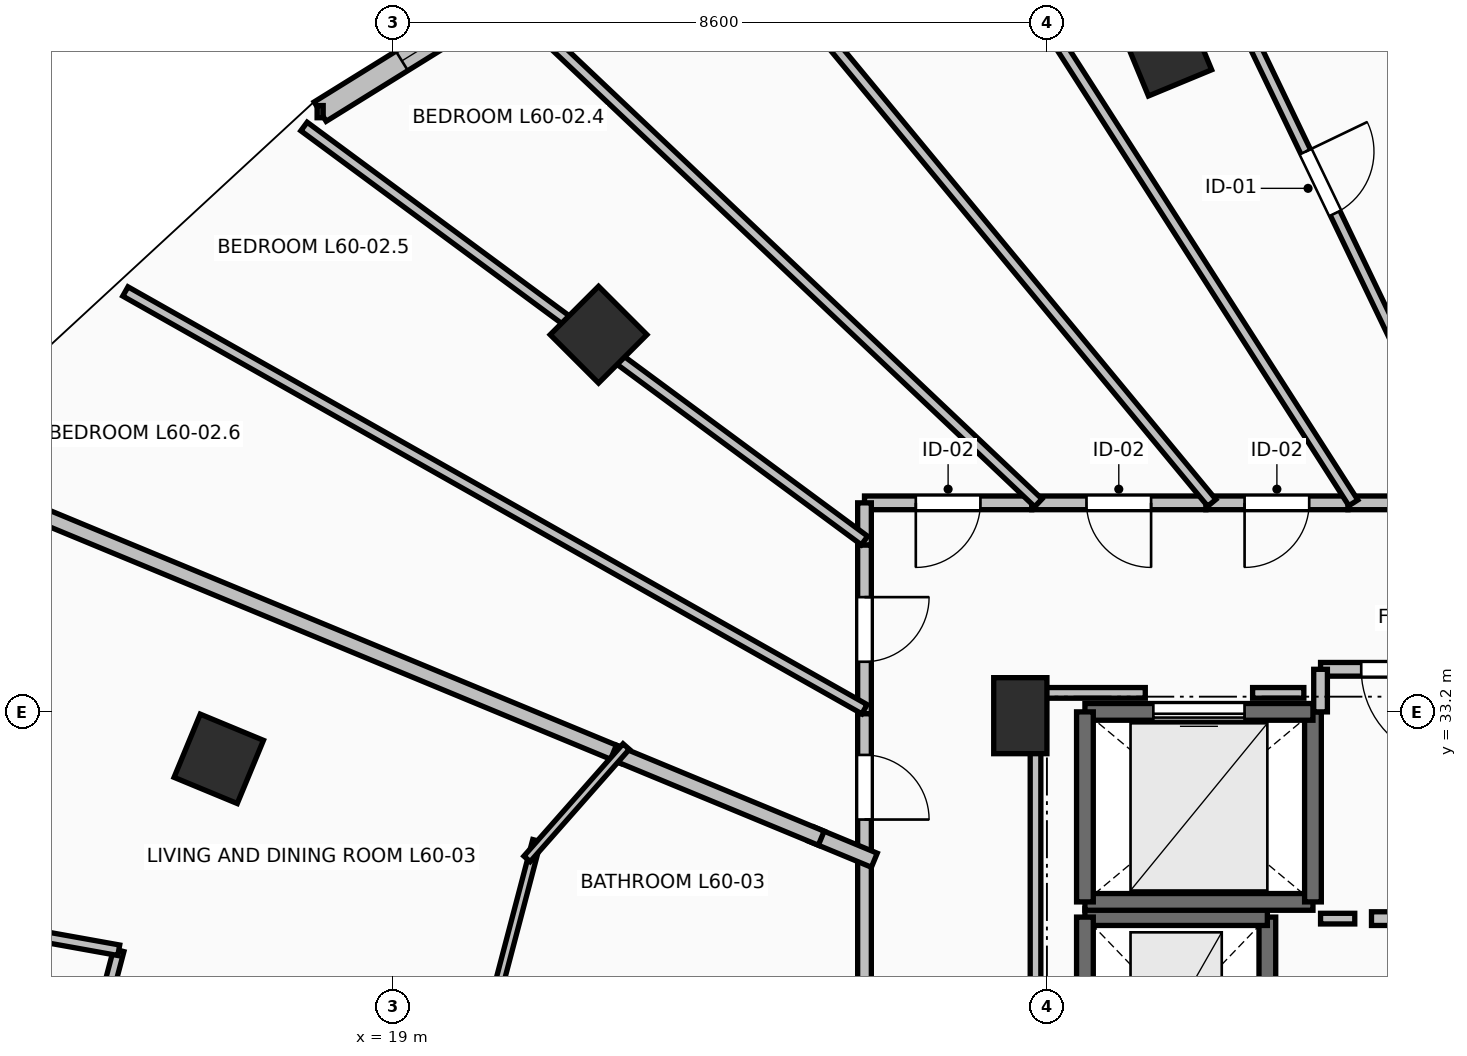
"""IFC4 building model, lengths in metres.
Left out: names, types, materials, properties, quantities, classifications, styles, units other than length and angle.
Written with IfcOpenShell. Run it as: python <this file> out.ifc"""

import sys

from ifc_helpers import new_model, si_unit, direction, frame, frame_2d, origin, origin_2d, place, context, subcontext, project, spatial, rectangle, extrude, element, fill, save


model = new_model("IFC4")
c1 = context("Model", 3, precision=1e-05, world=origin(), true_north=direction((0.0, 1.0)))
c2 = subcontext(c1, "Body", "Model", "MODEL_VIEW")
j1 = project(units=[si_unit("LENGTHUNIT", "METRE"), si_unit("PLANEANGLEUNIT", "RADIAN")], contexts=[c1])
p1 = place(None, origin())
s1 = spatial("IfcSite", under=j1, at=p1, CompositionType="ELEMENT")
p2 = place(p1, origin())
s2 = spatial("IfcBuilding", under=s1, at=p2, CompositionType="ELEMENT")
p3 = place(p2, frame((0.0, 0.0, 221.4)))
s3 = spatial("IfcBuildingStorey", under=s2, at=p3, CompositionType="ELEMENT", Elevation=221.4)
for number, where, z_axis, x_axis in (
    (1, (29.179, 41.891, 0.0), (0.0, 0.0, 1.0), (-0.383, 0.924, 0.0)),
    (2, (21.701, 38.162, 0.0), (0.0, 0.0, 1.0), (-0.707, 0.707, 0.0)),
    (3, (16.705, 32.582, 0.0), (0.0, 0.0, 1.0), (-0.924, 0.383, 0.0)),
):
    element("IfcColumn", number, at=place(p3, frame(where, z_axis=z_axis, x_axis=x_axis)), inside=s3, PredefinedType="COLUMN", context=c2, shape_type="SweptSolid", body=[
        extrude(rectangle(XDim=0.9, YDim=0.9, at=origin_2d()), origin(), (0.0, 0.0, 1.0), 3.55),
    ])
p4 = place(p3, frame((27.25, 33.15, 0.0), z_axis=(0.0, 0.0, 1.0), x_axis=(1.0, 0.0, 0.0)))
e4 = element("IfcColumn", 4, at=p4, inside=s3, PredefinedType="PILASTER", context=c2, shape_type="SweptSolid", body=[
    extrude(rectangle(XDim=0.7, YDim=1.0, at=origin_2d()), origin(), (0.0, 0.0, 1.0), 3.55),
])
p5 = place(p3, frame((22.316, 43.752, 0.0), z_axis=(0.0, 0.0, 1.0), x_axis=(-0.849647657754, -0.527350791858, 0.0)))
e5 = element("IfcWall", 5, at=p5, inside=s3, PredefinedType="STANDARD", context=c2, shape_type="SweptSolid", body=[
    extrude(rectangle(XDim=5.035, YDim=0.3, at=frame_2d((2.518, 0.0))), origin(), (0.0, 0.0, 1.0), 3.2),
])
p6 = place(p5, frame((0.555, 0.0, 0.85)))
e6 = element("IfcOpeningElement", 6, at=p6, cuts=e5, PredefinedType="OPENING", context=c2, shape_type="SweptSolid", body=[
    extrude(rectangle(XDim=1.2, YDim=1.95, at=frame_2d((0.6, 0.975))), frame((0.0, 0.165, 0.0), z_axis=(0.0, -1.0, 0.0), x_axis=(1.0, 0.0, 0.0)), (0.0, 0.0, 1.0), 0.33),
])
p7 = place(p5, frame((2.569, 0.0, 0.85)))
e7 = element("IfcOpeningElement", 7, at=p7, cuts=e5, PredefinedType="OPENING", context=c2, shape_type="SweptSolid", body=[
    extrude(rectangle(XDim=1.2, YDim=1.95, at=frame_2d((0.6, 0.975))), frame((0.0, 0.165, 0.0), z_axis=(0.0, -1.0, 0.0), x_axis=(1.0, 0.0, 0.0)), (0.0, 0.0, 1.0), 0.33),
])
p8 = place(p3, frame((30.5, 28.0, 0.0), z_axis=(0.0, 0.0, 1.0), x_axis=(0.0, 1.0, 0.0)))
e8 = element("IfcWall", 8, at=p8, inside=s3, PredefinedType="SHEAR", context=c2, shape_type="SweptSolid", body=[
    extrude(rectangle(XDim=2.5, YDim=0.22, at=frame_2d((1.25, 0.0))), origin(), (0.0, 0.0, 1.0), 3.2),
])
p9 = place(p3, frame((30.5, 30.5, 0.0), z_axis=(0.0, 0.0, 1.0), x_axis=(-1.0, 0.0, 0.0)))
e9 = element("IfcWall", 9, at=p9, inside=s3, PredefinedType="SHEAR", context=c2, shape_type="SweptSolid", body=[
    extrude(rectangle(XDim=2.4, YDim=0.22, at=frame_2d((1.2, 0.0))), origin(), (0.0, 0.0, 1.0), 3.2),
])
p10 = place(p3, frame((28.1, 30.5, 0.0), z_axis=(0.0, 0.0, 1.0), x_axis=(0.0, -1.0, 0.0)))
e10 = element("IfcWall", 10, at=p10, inside=s3, PredefinedType="SHEAR", context=c2, shape_type="SweptSolid", body=[
    extrude(rectangle(XDim=2.5, YDim=0.22, at=frame_2d((1.25, 0.0))), origin(), (0.0, 0.0, 1.0), 3.2),
])
p11 = place(p3, frame((28.1, 30.7, 0.0), z_axis=(0.0, 0.0, 1.0), x_axis=(1.0, 0.0, 0.0)))
e11 = element("IfcWall", 11, at=p11, inside=s3, PredefinedType="SOLIDWALL", context=c2, shape_type="SweptSolid", body=[
    extrude(rectangle(XDim=3.0, YDim=0.22, at=frame_2d((1.5, 0.0))), origin(), (0.0, 0.0, 1.0), 3.2),
])
p12 = place(p3, frame((31.1, 30.7, 0.0), z_axis=(0.0, 0.0, 1.0), x_axis=(0.0, 1.0, 0.0)))
e12 = element("IfcWall", 12, at=p12, inside=s3, PredefinedType="SOLIDWALL", context=c2, shape_type="SweptSolid", body=[
    extrude(rectangle(XDim=2.5, YDim=0.22, at=frame_2d((1.25, 0.0))), origin(), (0.0, 0.0, 1.0), 3.2),
])
p13 = place(p3, frame((31.1, 33.2, 0.0), z_axis=(0.0, 0.0, 1.0), x_axis=(-1.0, 0.0, 0.0)))
e13 = element("IfcWall", 13, at=p13, inside=s3, PredefinedType="SOLIDWALL", context=c2, shape_type="SweptSolid", body=[
    extrude(rectangle(XDim=3.0, YDim=0.22, at=frame_2d((1.5, 0.0))), origin(), (0.0, 0.0, 1.0), 3.2),
])
p14 = place(p13, frame((0.9, 0.0, 0.0)))
e14 = element("IfcOpeningElement", 14, at=p14, cuts=e13, PredefinedType="OPENING", context=c2, shape_type="SweptSolid", body=[
    extrude(rectangle(XDim=1.2, YDim=2.2, at=frame_2d((0.6, 1.1))), frame((0.0, 0.125, 0.0), z_axis=(0.0, -1.0, 0.0), x_axis=(1.0, 0.0, 0.0)), (0.0, 0.0, 1.0), 0.25),
])
p15 = place(p3, frame((28.1, 33.2, 0.0), z_axis=(0.0, 0.0, 1.0), x_axis=(0.0, -1.0, 0.0)))
e15 = element("IfcWall", 15, at=p15, inside=s3, PredefinedType="SOLIDWALL", context=c2, shape_type="SweptSolid", body=[
    extrude(rectangle(XDim=2.5, YDim=0.22, at=frame_2d((1.25, 0.0))), origin(), (0.0, 0.0, 1.0), 3.2),
])
p16 = place(p3, frame((31.87, 30.48, 0.0), z_axis=(0.0, 0.0, 1.0), x_axis=(1.0, 0.0, 0.0)))
e16 = element("IfcWall", 16, at=p16, inside=s3, PredefinedType="PARTITIONING", context=c2, shape_type="SweptSolid", body=[
    extrude(rectangle(XDim=1.6, YDim=0.18, at=frame_2d((0.8, 0.0))), origin(), (0.0, 0.0, 1.0), 3.2),
])
p17 = place(p3, frame((33.47, 33.76, 0.0), z_axis=(0.0, 0.0, 1.0), x_axis=(-1.0, 0.0, 0.0)))
e17 = element("IfcWall", 17, at=p17, inside=s3, PredefinedType="PARTITIONING", context=c2, shape_type="SweptSolid", body=[
    extrude(rectangle(XDim=2.27, YDim=0.18, at=frame_2d((1.135, 0.0))), origin(), (0.0, 0.0, 1.0), 3.2),
])
p18 = place(p17, frame((0.535, 0.0, 0.0)))
e18 = element("IfcOpeningElement", 18, at=p18, cuts=e17, PredefinedType="OPENING", context=c2, shape_type="SweptSolid", body=[
    extrude(rectangle(XDim=1.2, YDim=2.15, at=frame_2d((0.6, 1.075))), frame((0.0, 0.105, 0.0), z_axis=(0.0, -1.0, 0.0), x_axis=(1.0, 0.0, 0.0)), (0.0, 0.0, 1.0), 0.21),
])
p19 = place(p3, frame((31.2, 33.76, 0.0), z_axis=(0.0, 0.0, 1.0), x_axis=(0.0, -1.0, 0.0)))
e19 = element("IfcWall", 19, at=p19, inside=s3, PredefinedType="PARTITIONING", context=c2, shape_type="SweptSolid", body=[
    extrude(rectangle(XDim=0.56, YDim=0.18, at=frame_2d((0.28, 0.0))), origin(), (0.0, 0.0, 1.0), 3.2),
])
p20 = place(p3, frame((33.155, 35.95, 0.0), z_axis=(0.0, 0.0, 1.0), x_axis=(-1.0, 0.0, 0.0)))
e20 = element("IfcWall", 20, at=p20, inside=s3, PredefinedType="PARTITIONING", context=c2, shape_type="SweptSolid", body=[
    extrude(rectangle(XDim=1.595, YDim=0.18, at=frame_2d((0.797, 0.0))), origin(), (0.0, 0.0, 1.0), 3.2),
])
p21 = place(p3, frame((31.56, 35.95, 0.0), z_axis=(0.0, 0.0, 1.0), x_axis=(-1.0, 0.0, 0.0)))
e21 = element("IfcWall", 21, at=p21, inside=s3, PredefinedType="PARTITIONING", context=c2, shape_type="SweptSolid", body=[
    extrude(rectangle(XDim=1.869, YDim=0.18, at=frame_2d((0.935, 0.0))), origin(), (0.0, 0.0, 1.0), 2.392),
])
p22 = place(p21, frame((0.51, 0.0, 0.0)))
e22 = element("IfcOpeningElement", 22, at=p22, cuts=e21, PredefinedType="OPENING", context=c2, shape_type="SweptSolid", body=[
    extrude(rectangle(XDim=0.85, YDim=2.1, at=frame_2d((0.425, 1.05))), frame((0.0, 0.105, 0.0), z_axis=(0.0, -1.0, 0.0), x_axis=(1.0, 0.0, 0.0)), (0.0, 0.0, 1.0), 0.21),
])
p23 = place(p3, frame((29.691, 35.95, 0.0), z_axis=(0.0, 0.0, 1.0), x_axis=(-1.0, 0.0, 0.0)))
e23 = element("IfcWall", 23, at=p23, inside=s3, PredefinedType="PARTITIONING", context=c2, shape_type="SweptSolid", body=[
    extrude(rectangle(XDim=2.291, YDim=0.18, at=frame_2d((1.146, 0.0))), origin(), (0.0, 0.0, 1.0), 2.392),
])
p24 = place(p23, frame((0.72, 0.0, 0.0)))
e24 = element("IfcOpeningElement", 24, at=p24, cuts=e23, PredefinedType="OPENING", context=c2, shape_type="SweptSolid", body=[
    extrude(rectangle(XDim=0.85, YDim=2.1, at=frame_2d((0.425, 1.05))), frame((0.0, 0.105, 0.0), z_axis=(0.0, -1.0, 0.0), x_axis=(1.0, 0.0, 0.0)), (0.0, 0.0, 1.0), 0.21),
])
p25 = place(p3, frame((27.4, 35.95, 0.0), z_axis=(0.0, 0.0, 1.0), x_axis=(-1.0, 0.0, 0.0)))
e25 = element("IfcWall", 25, at=p25, inside=s3, PredefinedType="PARTITIONING", context=c2, shape_type="SweptSolid", body=[
    extrude(rectangle(XDim=2.2, YDim=0.18, at=frame_2d((1.1, 0.0))), origin(), (0.0, 0.0, 1.0), 2.834),
])
p26 = place(p25, frame((0.675, 0.0, 0.0)))
e26 = element("IfcOpeningElement", 26, at=p26, cuts=e25, PredefinedType="OPENING", context=c2, shape_type="SweptSolid", body=[
    extrude(rectangle(XDim=0.85, YDim=2.1, at=frame_2d((0.425, 1.05))), frame((0.0, 0.105, 0.0), z_axis=(0.0, -1.0, 0.0), x_axis=(1.0, 0.0, 0.0)), (0.0, 0.0, 1.0), 0.21),
])
p27 = place(p3, frame((25.2, 35.95, 0.0), z_axis=(0.0, 0.0, 1.0), x_axis=(0.0, -1.0, 0.0)))
e27 = element("IfcWall", 27, at=p27, inside=s3, PredefinedType="PARTITIONING", context=c2, shape_type="SweptSolid", body=[
    extrude(rectangle(XDim=0.556, YDim=0.18, at=frame_2d((0.278, 0.0))), origin(), (0.0, 0.0, 1.0), 3.2),
])
p28 = place(p3, frame((25.2, 35.394, 0.0), z_axis=(0.0, 0.0, 1.0), x_axis=(0.0, -1.0, 0.0)))
e28 = element("IfcWall", 28, at=p28, inside=s3, PredefinedType="PARTITIONING", context=c2, shape_type="SweptSolid", body=[
    extrude(rectangle(XDim=2.219, YDim=0.18, at=frame_2d((1.109, 0.0))), origin(), (0.0, 0.0, 1.0), 2.392),
])
p29 = place(p28, frame((0.685, 0.0, 0.0)))
e29 = element("IfcOpeningElement", 29, at=p29, cuts=e28, PredefinedType="OPENING", context=c2, shape_type="SweptSolid", body=[
    extrude(rectangle(XDim=0.85, YDim=2.1, at=frame_2d((0.425, 1.05))), frame((0.0, 0.105, 0.0), z_axis=(0.0, -1.0, 0.0), x_axis=(1.0, 0.0, 0.0)), (0.0, 0.0, 1.0), 0.21),
])
p30 = place(p3, frame((25.2, 33.175, 0.0), z_axis=(0.0, 0.0, 1.0), x_axis=(0.0, -1.0, 0.0)))
e30 = element("IfcWall", 30, at=p30, inside=s3, PredefinedType="PARTITIONING", context=c2, shape_type="SweptSolid", body=[
    extrude(rectangle(XDim=1.933, YDim=0.18, at=frame_2d((0.967, 0.0))), origin(), (0.0, 0.0, 1.0), 3.2),
])
p31 = place(p30, frame((0.542, 0.0, 0.0)))
e31 = element("IfcOpeningElement", 31, at=p31, cuts=e30, PredefinedType="OPENING", context=c2, shape_type="SweptSolid", body=[
    extrude(rectangle(XDim=0.85, YDim=2.1, at=frame_2d((0.425, 1.05))), frame((0.0, 0.105, 0.0), z_axis=(0.0, -1.0, 0.0), x_axis=(1.0, 0.0, 0.0)), (0.0, 0.0, 1.0), 0.21),
])
p32 = place(p3, frame((25.2, 31.382, 0.0), z_axis=(0.0, 0.0, 1.0), x_axis=(0.0, -1.0, 0.0)))
e32 = element("IfcWall", 32, at=p32, inside=s3, PredefinedType="PARTITIONING", context=c2, shape_type="SweptSolid", body=[
    extrude(rectangle(XDim=2.923, YDim=0.18, at=frame_2d((1.461, 0.0))), origin(), (0.0, 0.0, 1.0), 2.392),
])
p33 = place(p3, frame((29.174, 44.381, 0.0), z_axis=(0.0, 0.0, 1.0), x_axis=(0.432861754343, -0.901460316169, 0.0)))
e33 = element("IfcWall", 33, at=p33, inside=s3, PredefinedType="PARTITIONING", context=c2, shape_type="SweptSolid", body=[
    extrude(rectangle(XDim=9.353, YDim=0.14, at=frame_2d((4.676, 0.0))), origin(), (0.0, 0.0, 1.0), 2.392),
])
p34 = place(p33, frame((4.226, 0.0, 0.0)))
e34 = element("IfcOpeningElement", 34, at=p34, cuts=e33, PredefinedType="OPENING", context=c2, shape_type="SweptSolid", body=[
    extrude(rectangle(XDim=0.9, YDim=2.1, at=frame_2d((0.45, 1.05))), frame((0.0, 0.085, 0.0), z_axis=(0.0, -1.0, 0.0), x_axis=(1.0, 0.0, 0.0)), (0.0, 0.0, 1.0), 0.17),
])
p35 = place(p3, frame((25.749, 45.138, 0.0), z_axis=(0.0, 0.0, 1.0), x_axis=(0.539168632786, -0.842197830335, 0.0)))
e35 = element("IfcWall", 35, at=p35, inside=s3, PredefinedType="PARTITIONING", context=c2, shape_type="SweptSolid", body=[
    extrude(rectangle(XDim=10.909, YDim=0.14, at=frame_2d((5.455, 0.0))), origin(), (0.0, 0.0, 1.0), 2.392),
])
p36 = place(p3, frame((23.066, 44.052, 0.0), z_axis=(0.0, 0.0, 1.0), x_axis=(0.637453668746, -0.770488689211, 0.0)))
e36 = element("IfcWall", 36, at=p36, inside=s3, PredefinedType="PARTITIONING", context=c2, shape_type="SweptSolid", body=[
    extrude(rectangle(XDim=10.515, YDim=0.14, at=frame_2d((5.258, 0.0))), origin(), (0.0, 0.0, 1.0), 2.392),
])
p37 = place(p3, frame((20.462, 42.599, 0.0), z_axis=(0.0, 0.0, 1.0), x_axis=(0.726274273347, -0.687405033349, 0.0)))
e37 = element("IfcWall", 37, at=p37, inside=s3, PredefinedType="PARTITIONING", context=c2, shape_type="SweptSolid", body=[
    extrude(rectangle(XDim=9.673, YDim=0.14, at=frame_2d((4.836, 0.0))), origin(), (0.0, 0.0, 1.0), 2.734),
])
p38 = place(p3, frame((17.826, 40.901, 0.0), z_axis=(0.0, 0.0, 1.0), x_axis=(0.804363169868, -0.594137939338, 0.0)))
e38 = element("IfcWall", 38, at=p38, inside=s3, PredefinedType="PARTITIONING", context=c2, shape_type="SweptSolid", body=[
    extrude(rectangle(XDim=9.167, YDim=0.14, at=frame_2d((4.584, 0.0))), origin(), (0.0, 0.0, 1.0), 2.392),
])
p39 = place(p3, frame((15.476, 38.731, 0.0), z_axis=(0.0, 0.0, 1.0), x_axis=(0.870572608778, -0.49203997078, 0.0)))
e39 = element("IfcWall", 39, at=p39, inside=s3, PredefinedType="PARTITIONING", context=c2, shape_type="SweptSolid", body=[
    extrude(rectangle(XDim=11.169, YDim=0.14, at=frame_2d((5.585, 0.0))), origin(), (0.0, 0.0, 1.0), 2.734),
])
p40 = place(p3, frame((13.36, 36.206, 0.0), z_axis=(0.0, 0.0, 1.0), x_axis=(0.923875681471, -0.382692729466, 0.0)))
e40 = element("IfcWall", 40, at=p40, inside=s3, PredefinedType="PARTITIONING", context=c2, shape_type="SweptSolid", body=[
    extrude(rectangle(XDim=9.381, YDim=0.2, at=frame_2d((4.69, 0.0))), origin(), (0.0, 0.0, 1.0), 2.734),
])
p41 = place(p3, frame((24.502, 31.592, 0.0), z_axis=(0.0, 0.0, 1.0), x_axis=(0.923704487622, -0.383105755043, 0.0)))
e41 = element("IfcWall", 41, at=p41, inside=s3, PredefinedType="PARTITIONING", context=c2, shape_type="SweptSolid", body=[
    extrude(rectangle(XDim=0.896, YDim=0.2, at=frame_2d((0.448, 0.0))), origin(), (0.0, 0.0, 1.0), 3.2),
])
p42 = place(p3, frame((21.898, 32.67, 0.0), z_axis=(0.0, 0.0, 1.0), x_axis=(0.923953480513, -0.382504857286, 0.0)))
e42 = element("IfcWall", 42, at=p42, inside=s3, PredefinedType="PARTITIONING", context=c2, shape_type="SweptSolid", body=[
    extrude(rectangle(XDim=2.958, YDim=0.2, at=frame_2d((1.479, 0.0))), origin(), (0.0, 0.0, 1.0), 2.834),
])
p43 = place(p3, frame((20.324, 29.362, 0.0), z_axis=(0.0, 0.0, 1.0), x_axis=(0.254406599134, 0.967097348935, 0.0)))
e43 = element("IfcWall", 43, at=p43, inside=s3, PredefinedType="PARTITIONING", context=c2, shape_type="SweptSolid", body=[
    extrude(rectangle(XDim=2.218, YDim=0.11, at=frame_2d((1.109, 0.0))), origin(), (0.0, 0.0, 1.0), 2.392),
])
p44 = place(p3, frame((20.76, 31.266, 0.0), z_axis=(0.0, 0.0, 1.0), x_axis=(0.661699472354, 0.749769170003, 0.0)))
e44 = element("IfcWall", 44, at=p44, inside=s3, PredefinedType="PARTITIONING", context=c2, shape_type="SweptSolid", body=[
    extrude(rectangle(XDim=1.971, YDim=0.11, at=frame_2d((0.985, 0.0))), origin(), (0.0, 0.0, 1.0), 3.2),
])
p45 = place(p3, frame((15.389, 30.064, 0.0), z_axis=(0.0, 0.0, 1.0), x_axis=(-0.254356027292, -0.967110651053, 0.0)))
e45 = element("IfcWall", 45, at=p45, inside=s3, PredefinedType="PARTITIONING", context=c2, shape_type="SweptSolid", body=[
    extrude(rectangle(XDim=4.202, YDim=0.14, at=frame_2d((2.101, 0.0))), origin(), (0.0, 0.0, 1.0), 3.2),
])
p46 = place(p45, frame((1.651, 0.0, 0.0)))
e46 = element("IfcOpeningElement", 46, at=p46, cuts=e45, PredefinedType="OPENING", context=c2, shape_type="SweptSolid", body=[
    extrude(rectangle(XDim=0.9, YDim=2.1, at=frame_2d((0.45, 1.05))), frame((0.0, 0.085, 0.0), z_axis=(0.0, -1.0, 0.0), x_axis=(1.0, 0.0, 0.0)), (0.0, 0.0, 1.0), 0.17),
])
p47 = place(p3, frame((13.082, 30.478, 0.0), z_axis=(0.0, 0.0, 1.0), x_axis=(0.984255878712, -0.176749441923, 0.0)))
e47 = element("IfcWall", 47, at=p47, inside=s3, PredefinedType="PARTITIONING", context=c2, shape_type="SweptSolid", body=[
    extrude(rectangle(XDim=2.344, YDim=0.14, at=frame_2d((1.172, 0.0))), origin(), (0.0, 0.0, 1.0), 3.2),
])
p48 = place(p3, frame((31.2, 30.48, 0.0), z_axis=(0.0, 0.0, 1.0), x_axis=(1.0, 0.0, 0.0)))
e48 = element("IfcWall", 48, at=p48, inside=s3, PredefinedType="PARTITIONING", context=c2, shape_type="SweptSolid", body=[
    extrude(rectangle(XDim=0.45, YDim=0.14, at=frame_2d((0.225, 0.0))), origin(), (0.0, 0.0, 1.0), 3.2),
])
p49 = place(p3, frame((30.98, 33.45, 0.0), z_axis=(0.0, 0.0, 1.0), x_axis=(-1.0, 0.0, 0.0)))
e49 = element("IfcWall", 49, at=p49, inside=s3, PredefinedType="PARTITIONING", context=c2, shape_type="SweptSolid", body=[
    extrude(rectangle(XDim=0.674, YDim=0.14, at=frame_2d((0.337, 0.0))), origin(), (0.0, 0.0, 1.0), 3.2),
])
p50 = place(p3, frame((28.894, 33.45, 0.0), z_axis=(0.0, 0.0, 1.0), x_axis=(-1.0, 0.0, 0.0)))
e50 = element("IfcWall", 50, at=p50, inside=s3, PredefinedType="PARTITIONING", context=c2, shape_type="SweptSolid", body=[
    extrude(rectangle(XDim=1.444, YDim=0.14, at=frame_2d((0.722, 0.0))), origin(), (0.0, 0.0, 1.0), 2.392),
])
p51 = place(p3, frame((27.45, 33.45, 0.0), z_axis=(0.0, 0.0, 1.0), x_axis=(0.0, -1.0, 0.0)))
e51 = element("IfcWall", 51, at=p51, inside=s3, PredefinedType="PARTITIONING", context=c2, shape_type="SweptSolid", body=[
    extrude(rectangle(XDim=5.254, YDim=0.14, at=frame_2d((2.627, 0.0))), origin(), (0.0, 0.0, 1.0), 2.392),
])
p52 = place(p7, origin())
e52 = element("IfcWindow", 52, at=p52, inside=s3, PartitioningType="SINGLE_PANEL", PredefinedType="WINDOW", context=c2, shape_type="SweptSolid", body=[
    extrude(rectangle(XDim=1.2, YDim=1.95, at=frame_2d((0.6, 0.975))), frame((0.0, 0.03, 0.0), z_axis=(0.0, -1.0, 0.0), x_axis=(1.0, 0.0, 0.0)), (0.0, 0.0, 1.0), 0.06),
])
fill(e7, e52)
p53 = place(p14, origin())
e53 = element("IfcDoor", 53, at=p53, inside=s3, OperationType="SLIDING_TO_LEFT", PredefinedType="DOOR", context=c2, shape_type="SweptSolid", body=[
    extrude(rectangle(XDim=1.2, YDim=2.2, at=frame_2d((0.6, 1.1))), frame((0.0, 0.025, 0.0), z_axis=(0.0, -1.0, 0.0), x_axis=(1.0, 0.0, 0.0)), (0.0, 0.0, 1.0), 0.05),
])
fill(e14, e53)
p54 = place(p18, origin())
e54 = element("IfcDoor", 54, at=p54, inside=s3, OperationType="SINGLE_SWING_LEFT", PredefinedType="DOOR", context=c2, shape_type="SweptSolid", body=[
    extrude(rectangle(XDim=1.2, YDim=2.15, at=frame_2d((0.6, 1.075))), frame((0.0, 0.025, 0.0), z_axis=(0.0, -1.0, 0.0), x_axis=(1.0, 0.0, 0.0)), (0.0, 0.0, 1.0), 0.05),
])
fill(e18, e54)
p55 = place(p34, origin())
e55 = element("IfcDoor", 55, at=p55, inside=s3, OperationType="SINGLE_SWING_LEFT", PredefinedType="DOOR", context=c2, shape_type="SweptSolid", body=[
    extrude(rectangle(XDim=0.9, YDim=2.1, at=frame_2d((0.45, 1.05))), frame((0.0, 0.025, 0.0), z_axis=(0.0, -1.0, 0.0), x_axis=(1.0, 0.0, 0.0)), (0.0, 0.0, 1.0), 0.05),
])
fill(e34, e55)
p56 = place(p22, origin())
e56 = element("IfcDoor", 56, at=p56, inside=s3, OperationType="SINGLE_SWING_RIGHT", PredefinedType="DOOR", context=c2, shape_type="SweptSolid", body=[
    extrude(rectangle(XDim=0.85, YDim=2.1, at=frame_2d((0.425, 1.05))), frame((0.0, 0.025, 0.0), z_axis=(0.0, -1.0, 0.0), x_axis=(1.0, 0.0, 0.0)), (0.0, 0.0, 1.0), 0.05),
])
fill(e22, e56)
p57 = place(p24, origin())
e57 = element("IfcDoor", 57, at=p57, inside=s3, OperationType="SINGLE_SWING_LEFT", PredefinedType="DOOR", context=c2, shape_type="SweptSolid", body=[
    extrude(rectangle(XDim=0.85, YDim=2.1, at=frame_2d((0.425, 1.05))), frame((0.0, 0.025, 0.0), z_axis=(0.0, -1.0, 0.0), x_axis=(1.0, 0.0, 0.0)), (0.0, 0.0, 1.0), 0.05),
])
fill(e24, e57)
p58 = place(p26, origin())
e58 = element("IfcDoor", 58, at=p58, inside=s3, OperationType="SINGLE_SWING_RIGHT", PredefinedType="DOOR", context=c2, shape_type="SweptSolid", body=[
    extrude(rectangle(XDim=0.85, YDim=2.1, at=frame_2d((0.425, 1.05))), frame((0.0, 0.025, 0.0), z_axis=(0.0, -1.0, 0.0), x_axis=(1.0, 0.0, 0.0)), (0.0, 0.0, 1.0), 0.05),
])
fill(e26, e58)
p59 = place(p29, origin())
e59 = element("IfcDoor", 59, at=p59, inside=s3, OperationType="SINGLE_SWING_LEFT", PredefinedType="DOOR", context=c2, shape_type="SweptSolid", body=[
    extrude(rectangle(XDim=0.85, YDim=2.1, at=frame_2d((0.425, 1.05))), frame((0.0, 0.025, 0.0), z_axis=(0.0, -1.0, 0.0), x_axis=(1.0, 0.0, 0.0)), (0.0, 0.0, 1.0), 0.05),
])
fill(e29, e59)
p60 = place(p31, origin())
e60 = element("IfcDoor", 60, at=p60, inside=s3, OperationType="SINGLE_SWING_RIGHT", PredefinedType="DOOR", context=c2, shape_type="SweptSolid", body=[
    extrude(rectangle(XDim=0.85, YDim=2.1, at=frame_2d((0.425, 1.05))), frame((0.0, 0.025, 0.0), z_axis=(0.0, -1.0, 0.0), x_axis=(1.0, 0.0, 0.0)), (0.0, 0.0, 1.0), 0.05),
])
fill(e31, e60)
save(model, sys.argv[1])
